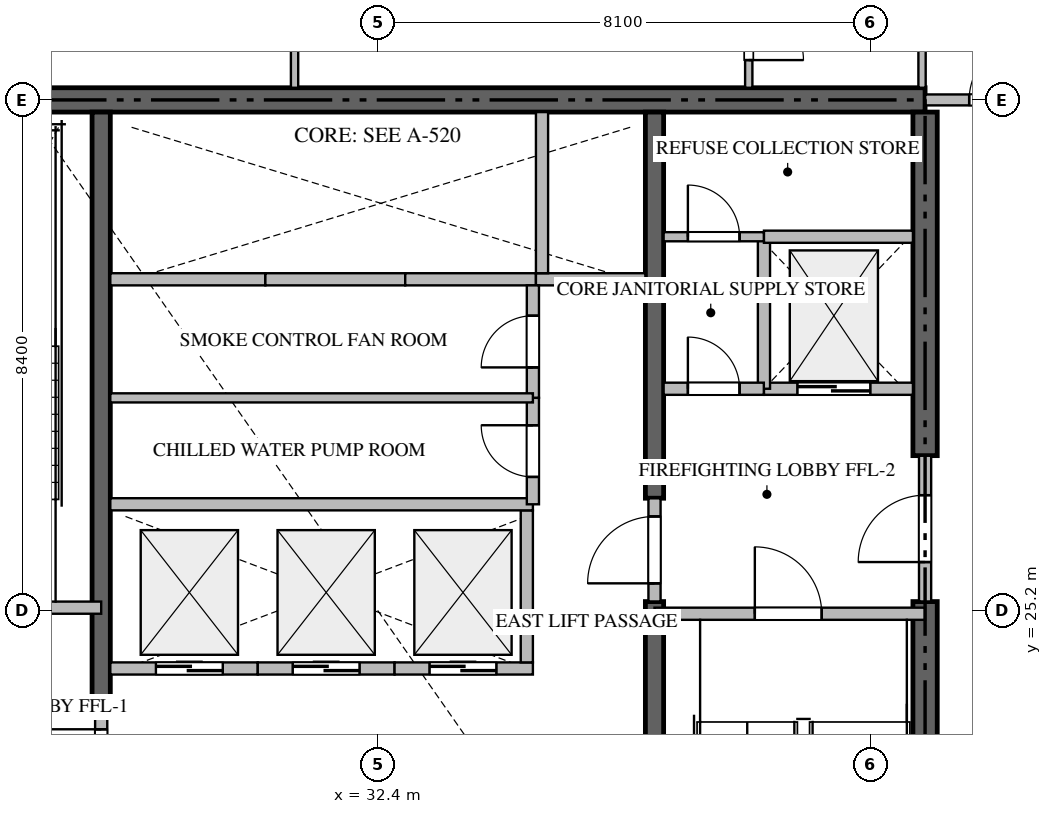
"""IFC4 building model, lengths in metres.
Left out: names, types, materials, properties, quantities, classifications, styles, units other than length and angle.
Written with IfcOpenShell. Run it as: python <this file> out.ifc"""

import sys

from ifc_helpers import new_model, si_unit, direction, frame, frame_2d, origin, place, context, subcontext, project, spatial, rectangle, extrude, source, transform, mapped, element, fill, save


model = new_model("IFC4")
c1 = context("Model", 3, precision=1e-05, world=origin(), true_north=direction((0.0, 1.0)))
c2 = subcontext(c1, "Body", "Model", "MODEL_VIEW")
j1 = project(units=[si_unit("LENGTHUNIT", "METRE"), si_unit("PLANEANGLEUNIT", "RADIAN")], contexts=[c1])
p1 = place(None, origin())
s1 = spatial("IfcSite", under=j1, at=p1, CompositionType="ELEMENT")
p2 = place(p1, origin())
s2 = spatial("IfcBuilding", under=s1, at=p2, CompositionType="ELEMENT")
p3 = place(p2, frame((0.0, 0.0, 153.9)))
s3 = spatial("IfcBuildingStorey", under=s2, at=p3, CompositionType="ELEMENT", Elevation=153.9)
p4 = place(p3, frame((41.4, 33.6, -0.26), z_axis=(0.0, 0.0, 1.0), x_axis=(-1.0, 0.0, 0.0)))
e1 = element("IfcWall", 1, at=p4, inside=s3, PredefinedType="SHEAR", context=c2, shape_type="SweptSolid", body=[
    extrude(rectangle(XDim=18.0, YDim=0.4, at=frame_2d((9.0, 0.0))), origin(), (0.0, 0.0, 1.0), 3.748),
])
p5 = place(p3, frame((41.4, 17.0, -0.26), z_axis=(0.0, 0.0, 1.0), x_axis=(0.0, 1.0, 0.0)))
e2 = element("IfcWall", 2, at=p5, inside=s3, PredefinedType="SHEAR", context=c2, shape_type="SweptSolid", body=[
    extrude(rectangle(XDim=8.35, YDim=0.4, at=frame_2d((4.175, 0.0))), origin(), (0.0, 0.0, 1.0), 3.748),
])
p6 = place(p3, frame((41.4, 27.75, -0.26), z_axis=(0.0, 0.0, 1.0), x_axis=(0.0, 1.0, 0.0)))
e3 = element("IfcWall", 3, at=p6, inside=s3, PredefinedType="SHEAR", context=c2, shape_type="SweptSolid", body=[
    extrude(rectangle(XDim=5.65, YDim=0.4, at=frame_2d((2.825, 0.0))), origin(), (0.0, 0.0, 1.0), 3.748),
])
p7 = place(p3, frame((27.85, 23.55, -0.26), z_axis=(0.0, 0.0, 1.0), x_axis=(0.0, 1.0, 0.0)))
e4 = element("IfcWall", 4, at=p7, inside=s3, PredefinedType="SHEAR", context=c2, shape_type="SweptSolid", body=[
    extrude(rectangle(XDim=9.85, YDim=0.3, at=frame_2d((4.925, 0.0))), origin(), (0.0, 0.0, 1.0), 3.748),
])
p8 = place(p3, frame((36.95, 17.0, -0.26), z_axis=(0.0, 0.0, 1.0), x_axis=(0.0, 1.0, 0.0)))
e5 = element("IfcWall", 5, at=p8, inside=s3, PredefinedType="SHEAR", context=c2, shape_type="SweptSolid", body=[
    extrude(rectangle(XDim=8.35, YDim=0.3, at=frame_2d((4.175, 0.0))), origin(), (0.0, 0.0, 1.0), 3.748),
])
p9 = place(p3, frame((36.95, 27.05, -0.26), z_axis=(0.0, 0.0, 1.0), x_axis=(0.0, 1.0, 0.0)))
e6 = element("IfcWall", 6, at=p9, inside=s3, PredefinedType="SHEAR", context=c2, shape_type="SweptSolid", body=[
    extrude(rectangle(XDim=6.35, YDim=0.3, at=frame_2d((3.175, 0.0))), origin(), (0.0, 0.0, 1.0), 3.748),
])
p10 = place(p3, frame((23.4, 25.25, 0.0), z_axis=(0.0, 0.0, 1.0), x_axis=(1.0, 0.0, 0.0)))
e7 = element("IfcWall", 7, at=p10, inside=s3, PredefinedType="STANDARD", context=c2, shape_type="SweptSolid", body=[
    extrude(rectangle(XDim=4.45, YDim=0.2, at=frame_2d((2.225, 0.0))), origin(), (0.0, 0.0, 1.0), 3.49),
])
p11 = place(p10, frame((1.65, 0.0, 0.0)))
e8 = element("IfcOpeningElement", 8, at=p11, cuts=e7, PredefinedType="OPENING", context=c2, shape_type="SweptSolid", body=[
    extrude(rectangle(XDim=1.1, YDim=2.15, at=frame_2d((0.55, 1.075))), frame((0.0, 0.11, 0.0), z_axis=(0.0, -1.0, 0.0), x_axis=(1.0, 0.0, 0.0)), (0.0, 0.0, 1.0), 0.22),
])
p12 = place(p3, frame((36.95, 25.15, 0.0), z_axis=(0.0, 0.0, 1.0), x_axis=(1.0, 0.0, 0.0)))
e9 = element("IfcWall", 9, at=p12, inside=s3, PredefinedType="STANDARD", context=c2, shape_type="SweptSolid", body=[
    extrude(rectangle(XDim=4.45, YDim=0.2, at=frame_2d((2.225, 0.0))), origin(), (0.0, 0.0, 1.0), 3.49),
])
p13 = place(p12, frame((1.65, 0.0, 0.0)))
e10 = element("IfcOpeningElement", 10, at=p13, cuts=e9, PredefinedType="OPENING", context=c2, shape_type="SweptSolid", body=[
    extrude(rectangle(XDim=1.1, YDim=2.15, at=frame_2d((0.55, 1.075))), frame((0.0, 0.11, 0.0), z_axis=(0.0, -1.0, 0.0), x_axis=(1.0, 0.0, 0.0)), (0.0, 0.0, 1.0), 0.22),
])
p14 = place(p3, frame((38.75, 28.85, 0.0), z_axis=(0.0, 0.0, 1.0), x_axis=(1.0, 0.0, 0.0)))
e11 = element("IfcWall", 11, at=p14, inside=s3, PredefinedType="STANDARD", context=c2, shape_type="SweptSolid", body=[
    extrude(rectangle(XDim=2.45, YDim=0.2, at=frame_2d((1.225, 0.0))), origin(), (0.0, 0.0, 1.0), 3.49),
])
p15 = place(p14, frame((0.55, 0.0, 0.0)))
e12 = element("IfcOpeningElement", 12, at=p15, cuts=e11, PredefinedType="OPENING", context=c2, shape_type="SweptSolid", body=[
    extrude(rectangle(XDim=1.2, YDim=2.2, at=frame_2d((0.6, 1.1))), frame((0.0, 0.11, 0.0), z_axis=(0.0, -1.0, 0.0), x_axis=(1.0, 0.0, 0.0)), (0.0, 0.0, 1.0), 0.22),
])
p16 = place(p3, frame((28.0, 24.25, 0.0), z_axis=(0.0, 0.0, 1.0), x_axis=(1.0, 0.0, 0.0)))
e13 = element("IfcWall", 13, at=p16, inside=s3, PredefinedType="STANDARD", context=c2, shape_type="SweptSolid", body=[
    extrude(rectangle(XDim=2.425, YDim=0.2, at=frame_2d((1.212, 0.0))), origin(), (0.0, 0.0, 1.0), 3.49),
])
p17 = place(p16, frame((0.75, 0.0, 0.0)))
e14 = element("IfcOpeningElement", 14, at=p17, cuts=e13, PredefinedType="OPENING", context=c2, shape_type="SweptSolid", body=[
    extrude(rectangle(XDim=1.1, YDim=2.2, at=frame_2d((0.55, 1.1))), frame((0.0, 0.11, 0.0), z_axis=(0.0, -1.0, 0.0), x_axis=(1.0, 0.0, 0.0)), (0.0, 0.0, 1.0), 0.22),
])
p18 = place(p3, frame((30.425, 24.25, 0.0), z_axis=(0.0, 0.0, 1.0), x_axis=(1.0, 0.0, 0.0)))
e15 = element("IfcWall", 15, at=p18, inside=s3, PredefinedType="STANDARD", context=c2, shape_type="SweptSolid", body=[
    extrude(rectangle(XDim=2.25, YDim=0.2, at=frame_2d((1.125, 0.0))), origin(), (0.0, 0.0, 1.0), 3.49),
])
p19 = place(p18, frame((0.575, 0.0, 0.0)))
e16 = element("IfcOpeningElement", 16, at=p19, cuts=e15, PredefinedType="OPENING", context=c2, shape_type="SweptSolid", body=[
    extrude(rectangle(XDim=1.1, YDim=2.2, at=frame_2d((0.55, 1.1))), frame((0.0, 0.11, 0.0), z_axis=(0.0, -1.0, 0.0), x_axis=(1.0, 0.0, 0.0)), (0.0, 0.0, 1.0), 0.22),
])
p20 = place(p3, frame((32.675, 24.25, 0.0), z_axis=(0.0, 0.0, 1.0), x_axis=(1.0, 0.0, 0.0)))
e17 = element("IfcWall", 17, at=p20, inside=s3, PredefinedType="STANDARD", context=c2, shape_type="SweptSolid", body=[
    extrude(rectangle(XDim=2.275, YDim=0.2, at=frame_2d((1.137, 0.0))), origin(), (0.0, 0.0, 1.0), 3.49),
])
p21 = place(p20, frame((0.575, 0.0, 0.0)))
e18 = element("IfcOpeningElement", 18, at=p21, cuts=e17, PredefinedType="OPENING", context=c2, shape_type="SweptSolid", body=[
    extrude(rectangle(XDim=1.1, YDim=2.2, at=frame_2d((0.55, 1.1))), frame((0.0, 0.11, 0.0), z_axis=(0.0, -1.0, 0.0), x_axis=(1.0, 0.0, 0.0)), (0.0, 0.0, 1.0), 0.22),
])
p22 = place(p3, frame((34.85, 24.35, 0.0), z_axis=(0.0, 0.0, 1.0), x_axis=(0.0, 1.0, 0.0)))
e19 = element("IfcWall", 19, at=p22, inside=s3, PredefinedType="STANDARD", context=c2, shape_type="SweptSolid", body=[
    extrude(rectangle(XDim=2.5, YDim=0.2, at=frame_2d((1.25, 0.0))), origin(), (0.0, 0.0, 1.0), 3.49),
])
p23 = place(p3, frame((28.0, 30.65, 0.0), z_axis=(0.0, 0.0, 1.0), x_axis=(1.0, 0.0, 0.0)))
e20 = element("IfcWall", 20, at=p23, inside=s3, PredefinedType="STANDARD", context=c2, shape_type="SweptSolid", body=[
    extrude(rectangle(XDim=2.55, YDim=0.2, at=frame_2d((1.275, 0.0))), origin(), (0.0, 0.0, 1.0), 3.49),
])
p24 = place(p3, frame((30.55, 30.65, 0.0), z_axis=(0.0, 0.0, 1.0), x_axis=(1.0, 0.0, 0.0)))
e21 = element("IfcWall", 21, at=p24, inside=s3, PredefinedType="STANDARD", context=c2, shape_type="SweptSolid", body=[
    extrude(rectangle(XDim=2.3, YDim=0.2, at=frame_2d((1.15, 0.0))), origin(), (0.0, 0.0, 1.0), 3.49),
])
p25 = place(p3, frame((32.85, 30.65, 0.0), z_axis=(0.0, 0.0, 1.0), x_axis=(1.0, 0.0, 0.0)))
e22 = element("IfcWall", 22, at=p25, inside=s3, PredefinedType="STANDARD", context=c2, shape_type="SweptSolid", body=[
    extrude(rectangle(XDim=2.15, YDim=0.2, at=frame_2d((1.075, 0.0))), origin(), (0.0, 0.0, 1.0), 3.49),
])
p26 = place(p3, frame((35.0, 30.65, 0.0), z_axis=(0.0, 0.0, 1.0), x_axis=(1.0, 0.0, 0.0)))
e23 = element("IfcWall", 23, at=p26, inside=s3, PredefinedType="STANDARD", context=c2, shape_type="SweptSolid", body=[
    extrude(rectangle(XDim=1.8, YDim=0.2, at=frame_2d((0.9, 0.0))), origin(), (0.0, 0.0, 1.0), 3.49),
])
p27 = place(p3, frame((35.1, 30.75, 0.0), z_axis=(0.0, 0.0, 1.0), x_axis=(0.0, 1.0, 0.0)))
e24 = element("IfcWall", 24, at=p27, inside=s3, PredefinedType="STANDARD", context=c2, shape_type="SweptSolid", body=[
    extrude(rectangle(XDim=2.65, YDim=0.2, at=frame_2d((1.325, 0.0))), origin(), (0.0, 0.0, 1.0), 3.49),
])
p28 = place(p3, frame((38.75, 28.85, 0.0), z_axis=(0.0, 0.0, 1.0), x_axis=(0.0, 1.0, 0.0)))
e25 = element("IfcWall", 25, at=p28, inside=s3, PredefinedType="STANDARD", context=c2, shape_type="SweptSolid", body=[
    extrude(rectangle(XDim=2.5, YDim=0.2, at=frame_2d((1.25, 0.0))), origin(), (0.0, 0.0, 1.0), 3.49),
])
p29 = place(p3, frame((38.75, 31.35, 0.0), z_axis=(0.0, 0.0, 1.0), x_axis=(1.0, 0.0, 0.0)))
e26 = element("IfcWall", 26, at=p29, inside=s3, PredefinedType="STANDARD", context=c2, shape_type="SweptSolid", body=[
    extrude(rectangle(XDim=2.45, YDim=0.2, at=frame_2d((1.225, 0.0))), origin(), (0.0, 0.0, 1.0), 3.49),
])
p30 = place(p3, frame((37.1, 28.85, 0.0), z_axis=(0.0, 0.0, 1.0), x_axis=(1.0, 0.0, 0.0)))
e27 = element("IfcWall", 27, at=p30, inside=s3, PredefinedType="STANDARD", context=c2, shape_type="SweptSolid", body=[
    extrude(rectangle(XDim=1.648, YDim=0.2, at=frame_2d((0.824, 0.0))), origin(), (0.0, 0.0, 1.0), 3.49),
])
p31 = place(p30, frame((0.399, 0.0, 0.0)))
e28 = element("IfcOpeningElement", 28, at=p31, cuts=e27, PredefinedType="OPENING", context=c2, shape_type="SweptSolid", body=[
    extrude(rectangle(XDim=0.85, YDim=2.1, at=frame_2d((0.425, 1.05))), frame((0.0, 0.11, 0.0), z_axis=(0.0, -1.0, 0.0), x_axis=(1.0, 0.0, 0.0)), (0.0, 0.0, 1.0), 0.22),
])
p32 = place(p3, frame((41.4, 25.352, 0.0), z_axis=(0.0, 0.0, 1.0), x_axis=(0.0, 1.0, 0.0)))
e29 = element("IfcWall", 29, at=p32, inside=s3, PredefinedType="STANDARD", context=c2, shape_type="SweptSolid", body=[
    extrude(rectangle(XDim=2.396, YDim=0.2, at=frame_2d((1.198, 0.0))), origin(), (0.0, 0.0, 1.0), 3.49),
])
p33 = place(p32, frame((0.648, 0.0, 0.0)))
e30 = element("IfcOpeningElement", 30, at=p33, cuts=e29, PredefinedType="OPENING", context=c2, shape_type="SweptSolid", body=[
    extrude(rectangle(XDim=1.1, YDim=2.15, at=frame_2d((0.55, 1.075))), frame((0.0, 0.11, 0.0), z_axis=(0.0, -1.0, 0.0), x_axis=(1.0, 0.0, 0.0)), (0.0, 0.0, 1.0), 0.22),
])
p34 = place(p3, frame((27.85, 21.852, 0.0), z_axis=(0.0, 0.0, 1.0), x_axis=(0.0, 1.0, 0.0)))
e31 = element("IfcWall", 31, at=p34, inside=s3, PredefinedType="STANDARD", context=c2, shape_type="SweptSolid", body=[
    extrude(rectangle(XDim=1.696, YDim=0.2, at=frame_2d((0.848, 0.0))), origin(), (0.0, 0.0, 1.0), 3.49),
])
p35 = place(p34, frame((0.298, 0.0, 0.0)))
e32 = element("IfcOpeningElement", 32, at=p35, cuts=e31, PredefinedType="OPENING", context=c2, shape_type="SweptSolid", body=[
    extrude(rectangle(XDim=1.1, YDim=2.15, at=frame_2d((0.55, 1.075))), frame((0.0, 0.11, 0.0), z_axis=(0.0, -1.0, 0.0), x_axis=(1.0, 0.0, 0.0)), (0.0, 0.0, 1.0), 0.22),
])
p36 = place(p3, frame((36.95, 25.352, 0.0), z_axis=(0.0, 0.0, 1.0), x_axis=(0.0, 1.0, 0.0)))
e33 = element("IfcWall", 33, at=p36, inside=s3, PredefinedType="STANDARD", context=c2, shape_type="SweptSolid", body=[
    extrude(rectangle(XDim=1.696, YDim=0.2, at=frame_2d((0.848, 0.0))), origin(), (0.0, 0.0, 1.0), 3.49),
])
p37 = place(p36, frame((0.298, 0.0, 0.0)))
e34 = element("IfcOpeningElement", 34, at=p37, cuts=e33, PredefinedType="OPENING", context=c2, shape_type="SweptSolid", body=[
    extrude(rectangle(XDim=1.1, YDim=2.15, at=frame_2d((0.55, 1.075))), frame((0.0, 0.11, 0.0), z_axis=(0.0, -1.0, 0.0), x_axis=(1.0, 0.0, 0.0)), (0.0, 0.0, 1.0), 0.22),
])
p38 = place(p3, frame((28.0, 26.95, 0.0), z_axis=(0.0, 0.0, 1.0), x_axis=(1.0, 0.0, 0.0)))
e35 = element("IfcWall", 35, at=p38, inside=s3, PredefinedType="STANDARD", context=c2, shape_type="SweptSolid", body=[
    extrude(rectangle(XDim=6.95, YDim=0.2, at=frame_2d((3.475, 0.0))), origin(), (0.0, 0.0, 1.0), 3.49),
])
p39 = place(p3, frame((37.1, 31.35, 0.0), z_axis=(0.0, 0.0, 1.0), x_axis=(1.0, 0.0, 0.0)))
e36 = element("IfcWall", 36, at=p39, inside=s3, PredefinedType="PARTITIONING", context=c2, shape_type="SweptSolid", body=[
    extrude(rectangle(XDim=1.648, YDim=0.15, at=frame_2d((0.824, 0.0))), origin(), (0.0, 0.0, 1.0), 3.49),
])
p40 = place(p39, frame((0.399, 0.0, 0.0)))
e37 = element("IfcOpeningElement", 37, at=p40, cuts=e36, PredefinedType="OPENING", context=c2, shape_type="SweptSolid", body=[
    extrude(rectangle(XDim=0.85, YDim=2.1, at=frame_2d((0.425, 1.05))), frame((0.0, 0.085, 0.0), z_axis=(0.0, -1.0, 0.0), x_axis=(1.0, 0.0, 0.0)), (0.0, 0.0, 1.0), 0.17),
])
p41 = place(p3, frame((34.95, 26.95, 0.0), z_axis=(0.0, 0.0, 1.0), x_axis=(0.0, 1.0, 0.0)))
e38 = element("IfcWall", 38, at=p41, inside=s3, PredefinedType="STANDARD", context=c2, shape_type="SweptSolid", body=[
    extrude(rectangle(XDim=1.75, YDim=0.2, at=frame_2d((0.875, 0.0))), origin(), (0.0, 0.0, 1.0), 3.49),
])
p42 = place(p41, frame((0.45, 0.0, 0.0)))
e39 = element("IfcOpeningElement", 39, at=p42, cuts=e38, PredefinedType="OPENING", context=c2, shape_type="SweptSolid", body=[
    extrude(rectangle(XDim=0.85, YDim=2.1, at=frame_2d((0.425, 1.05))), frame((0.0, 0.11, 0.0), z_axis=(0.0, -1.0, 0.0), x_axis=(1.0, 0.0, 0.0)), (0.0, 0.0, 1.0), 0.22),
])
p43 = place(p3, frame((34.95, 28.702, 0.0), z_axis=(0.0, 0.0, 1.0), x_axis=(0.0, 1.0, 0.0)))
e40 = element("IfcWall", 40, at=p43, inside=s3, PredefinedType="STANDARD", context=c2, shape_type="SweptSolid", body=[
    extrude(rectangle(XDim=1.848, YDim=0.2, at=frame_2d((0.924, 0.0))), origin(), (0.0, 0.0, 1.0), 3.49),
])
p44 = place(p43, frame((0.499, 0.0, 0.0)))
e41 = element("IfcOpeningElement", 41, at=p44, cuts=e40, PredefinedType="OPENING", context=c2, shape_type="SweptSolid", body=[
    extrude(rectangle(XDim=0.85, YDim=2.1, at=frame_2d((0.425, 1.05))), frame((0.0, 0.11, 0.0), z_axis=(0.0, -1.0, 0.0), x_axis=(1.0, 0.0, 0.0)), (0.0, 0.0, 1.0), 0.22),
])
p45 = place(p3, frame((28.0, 28.7, 0.0), z_axis=(0.0, 0.0, 1.0), x_axis=(1.0, 0.0, 0.0)))
e42 = element("IfcWall", 42, at=p45, inside=s3, PredefinedType="PARTITIONING", context=c2, shape_type="SweptSolid", body=[
    extrude(rectangle(XDim=6.95, YDim=0.15, at=frame_2d((3.475, 0.0))), origin(), (0.0, 0.0, 1.0), 3.49),
])
p46 = place(p3, frame((41.402, 33.6, 0.0), z_axis=(0.0, 0.0, 1.0), x_axis=(1.0, 0.0, 0.0)))
e43 = element("IfcWall", 43, at=p46, inside=s3, PredefinedType="PARTITIONING", context=c2, shape_type="SweptSolid", body=[
    extrude(rectangle(XDim=2.446, YDim=0.18, at=frame_2d((1.223, 0.0))), origin(), (0.0, 0.0, 1.0), 3.49),
])
p47 = place(p46, frame((0.723, 0.0, 0.0)))
e44 = element("IfcOpeningElement", 44, at=p47, cuts=e43, PredefinedType="OPENING", context=c2, shape_type="SweptSolid", body=[
    extrude(rectangle(XDim=1.0, YDim=2.15, at=frame_2d((0.5, 1.075))), frame((0.0, 0.1, 0.0), z_axis=(0.0, -1.0, 0.0), x_axis=(1.0, 0.0, 0.0)), (0.0, 0.0, 1.0), 0.2),
])
p48 = place(p3, frame((41.35, 36.35, 0.0), z_axis=(0.0, 0.0, 1.0), x_axis=(0.0, -1.0, 0.0)))
e45 = element("IfcWall", 45, at=p48, inside=s3, PredefinedType="PARTITIONING", context=c2, shape_type="SweptSolid", body=[
    extrude(rectangle(XDim=2.55, YDim=0.12, at=frame_2d((1.275, 0.0))), origin(), (0.0, 0.0, 1.0), 3.49),
])
p49 = place(p3, frame((38.5, 35.75, 0.0), z_axis=(0.0, 0.0, 1.0), x_axis=(0.0, -1.0, 0.0)))
e46 = element("IfcWall", 46, at=p49, inside=s3, PredefinedType="PARTITIONING", context=c2, shape_type="SweptSolid", body=[
    extrude(rectangle(XDim=1.95, YDim=0.12, at=frame_2d((0.975, 0.0))), origin(), (0.0, 0.0, 1.0), 3.49),
])
p50 = place(p49, frame((0.595, 0.0, 0.0)))
e47 = element("IfcOpeningElement", 47, at=p50, cuts=e46, PredefinedType="OPENING", context=c2, shape_type="SweptSolid", body=[
    extrude(rectangle(XDim=0.9, YDim=2.1, at=frame_2d((0.45, 1.05))), frame((0.0, 0.07, 0.0), z_axis=(0.0, -1.0, 0.0), x_axis=(1.0, 0.0, 0.0)), (0.0, 0.0, 1.0), 0.14),
])
p51 = place(p3, frame((31.03, 35.748, 0.0), z_axis=(0.0, 0.0, 1.0), x_axis=(0.0, -1.0, 0.0)))
e48 = element("IfcWall", 48, at=p51, inside=s3, PredefinedType="PARTITIONING", context=c2, shape_type="SweptSolid", body=[
    extrude(rectangle(XDim=1.948, YDim=0.12, at=frame_2d((0.974, 0.0))), origin(), (0.0, 0.0, 1.0), 3.49),
])
m1 = source(origin(), c2, "Body", "SweptSolid", [
    extrude(rectangle(XDim=1.1, YDim=2.15, at=frame_2d((0.55, 1.075))), frame((0.0, 0.025, 0.0), z_axis=(0.0, -1.0, 0.0), x_axis=(1.0, 0.0, 0.0)), (0.0, 0.0, 1.0), 0.05),
])
p52 = place(p13, origin())
e49 = element("IfcDoor", 49, at=p52, inside=s3, OperationType="SINGLE_SWING_LEFT", PredefinedType="DOOR", context=c2, shape_type="MappedRepresentation", body=[
    mapped(m1, transform((0.0, 0.0, 0.0), scale=1.0)),
])
fill(e10, e49)
m2 = source(origin(), c2, "Body", "SweptSolid", [
    extrude(rectangle(XDim=1.2, YDim=2.2, at=frame_2d((0.6, 1.1))), frame((0.0, 0.025, 0.0), z_axis=(0.0, -1.0, 0.0), x_axis=(1.0, 0.0, 0.0)), (0.0, 0.0, 1.0), 0.05),
])
p53 = place(p15, origin())
e50 = element("IfcDoor", 50, at=p53, inside=s3, OperationType="DOUBLE_DOOR_SLIDING", PredefinedType="DOOR", context=c2, shape_type="MappedRepresentation", body=[
    mapped(m2, transform((0.0, 0.0, 0.0), scale=1.0)),
])
fill(e12, e50)
m3 = source(origin(), c2, "Body", "SweptSolid", [
    extrude(rectangle(XDim=1.1, YDim=2.2, at=frame_2d((0.55, 1.1))), frame((0.0, 0.025, 0.0), z_axis=(0.0, -1.0, 0.0), x_axis=(1.0, 0.0, 0.0)), (0.0, 0.0, 1.0), 0.05),
])
p54 = place(p17, origin())
e51 = element("IfcDoor", 51, at=p54, inside=s3, OperationType="DOUBLE_DOOR_SLIDING", PredefinedType="DOOR", context=c2, shape_type="MappedRepresentation", body=[
    mapped(m3, transform((0.0, 0.0, 0.0), scale=1.0)),
])
fill(e14, e51)
p55 = place(p19, origin())
e52 = element("IfcDoor", 52, at=p55, inside=s3, OperationType="DOUBLE_DOOR_SLIDING", PredefinedType="DOOR", context=c2, shape_type="MappedRepresentation", body=[
    mapped(m3, transform((0.0, 0.0, 0.0), scale=1.0)),
])
fill(e16, e52)
p56 = place(p21, origin())
e53 = element("IfcDoor", 53, at=p56, inside=s3, OperationType="DOUBLE_DOOR_SLIDING", PredefinedType="DOOR", context=c2, shape_type="MappedRepresentation", body=[
    mapped(m3, transform((0.0, 0.0, 0.0), scale=1.0)),
])
fill(e18, e53)
m4 = source(origin(), c2, "Body", "SweptSolid", [
    extrude(rectangle(XDim=0.85, YDim=2.1, at=frame_2d((0.425, 1.05))), frame((0.0, 0.025, 0.0), z_axis=(0.0, -1.0, 0.0), x_axis=(1.0, 0.0, 0.0)), (0.0, 0.0, 1.0), 0.05),
])
p57 = place(p31, origin())
e54 = element("IfcDoor", 54, at=p57, inside=s3, OperationType="SINGLE_SWING_LEFT", PredefinedType="DOOR", context=c2, shape_type="MappedRepresentation", body=[
    mapped(m4, transform((0.0, 0.0, 0.0), scale=1.0)),
])
fill(e28, e54)
p58 = place(p33, origin())
e55 = element("IfcDoor", 55, at=p58, inside=s3, OperationType="SINGLE_SWING_LEFT", PredefinedType="DOOR", context=c2, shape_type="MappedRepresentation", body=[
    mapped(m1, transform((0.0, 0.0, 0.0), scale=1.0)),
])
fill(e30, e55)
p59 = place(p35, origin())
e56 = element("IfcDoor", 56, at=p59, inside=s3, OperationType="SINGLE_SWING_RIGHT", PredefinedType="DOOR", context=c2, shape_type="MappedRepresentation", body=[
    mapped(m1, transform((0.0, 0.0, 0.0), scale=1.0)),
])
fill(e32, e56)
p60 = place(p37, origin())
e57 = element("IfcDoor", 57, at=p60, inside=s3, OperationType="SINGLE_SWING_LEFT", PredefinedType="DOOR", context=c2, shape_type="MappedRepresentation", body=[
    mapped(m1, transform((0.0, 0.0, 0.0), scale=1.0)),
])
fill(e34, e57)
p61 = place(p40, origin())
e58 = element("IfcDoor", 58, at=p61, inside=s3, OperationType="SINGLE_SWING_LEFT", PredefinedType="DOOR", context=c2, shape_type="MappedRepresentation", body=[
    mapped(m4, transform((0.0, 0.0, 0.0), scale=1.0)),
])
fill(e37, e58)
p62 = place(p42, origin())
e59 = element("IfcDoor", 59, at=p62, inside=s3, OperationType="SINGLE_SWING_RIGHT", PredefinedType="DOOR", context=c2, shape_type="MappedRepresentation", body=[
    mapped(m4, transform((0.0, 0.0, 0.0), scale=1.0)),
])
fill(e39, e59)
p63 = place(p44, origin())
e60 = element("IfcDoor", 60, at=p63, inside=s3, OperationType="SINGLE_SWING_LEFT", PredefinedType="DOOR", context=c2, shape_type="MappedRepresentation", body=[
    mapped(m4, transform((0.0, 0.0, 0.0), scale=1.0)),
])
fill(e41, e60)
m5 = source(origin(), c2, "Body", "SweptSolid", [
    extrude(rectangle(XDim=1.0, YDim=2.15, at=frame_2d((0.5, 1.075))), frame((0.0, 0.025, 0.0), z_axis=(0.0, -1.0, 0.0), x_axis=(1.0, 0.0, 0.0)), (0.0, 0.0, 1.0), 0.05),
])
p64 = place(p47, origin())
e61 = element("IfcDoor", 61, at=p64, inside=s3, OperationType="SINGLE_SWING_RIGHT", PredefinedType="DOOR", context=c2, shape_type="MappedRepresentation", body=[
    mapped(m5, transform((0.0, 0.0, 0.0), scale=1.0)),
])
fill(e44, e61)
m6 = source(origin(), c2, "Body", "SweptSolid", [
    extrude(rectangle(XDim=0.9, YDim=2.1, at=frame_2d((0.45, 1.05))), frame((0.0, 0.025, 0.0), z_axis=(0.0, -1.0, 0.0), x_axis=(1.0, 0.0, 0.0)), (0.0, 0.0, 1.0), 0.05),
])
p65 = place(p50, origin())
e62 = element("IfcDoor", 62, at=p65, inside=s3, OperationType="SINGLE_SWING_RIGHT", PredefinedType="DOOR", context=c2, shape_type="MappedRepresentation", body=[
    mapped(m6, transform((0.0, 0.0, 0.0), scale=1.0)),
])
fill(e47, e62)
save(model, sys.argv[1])
